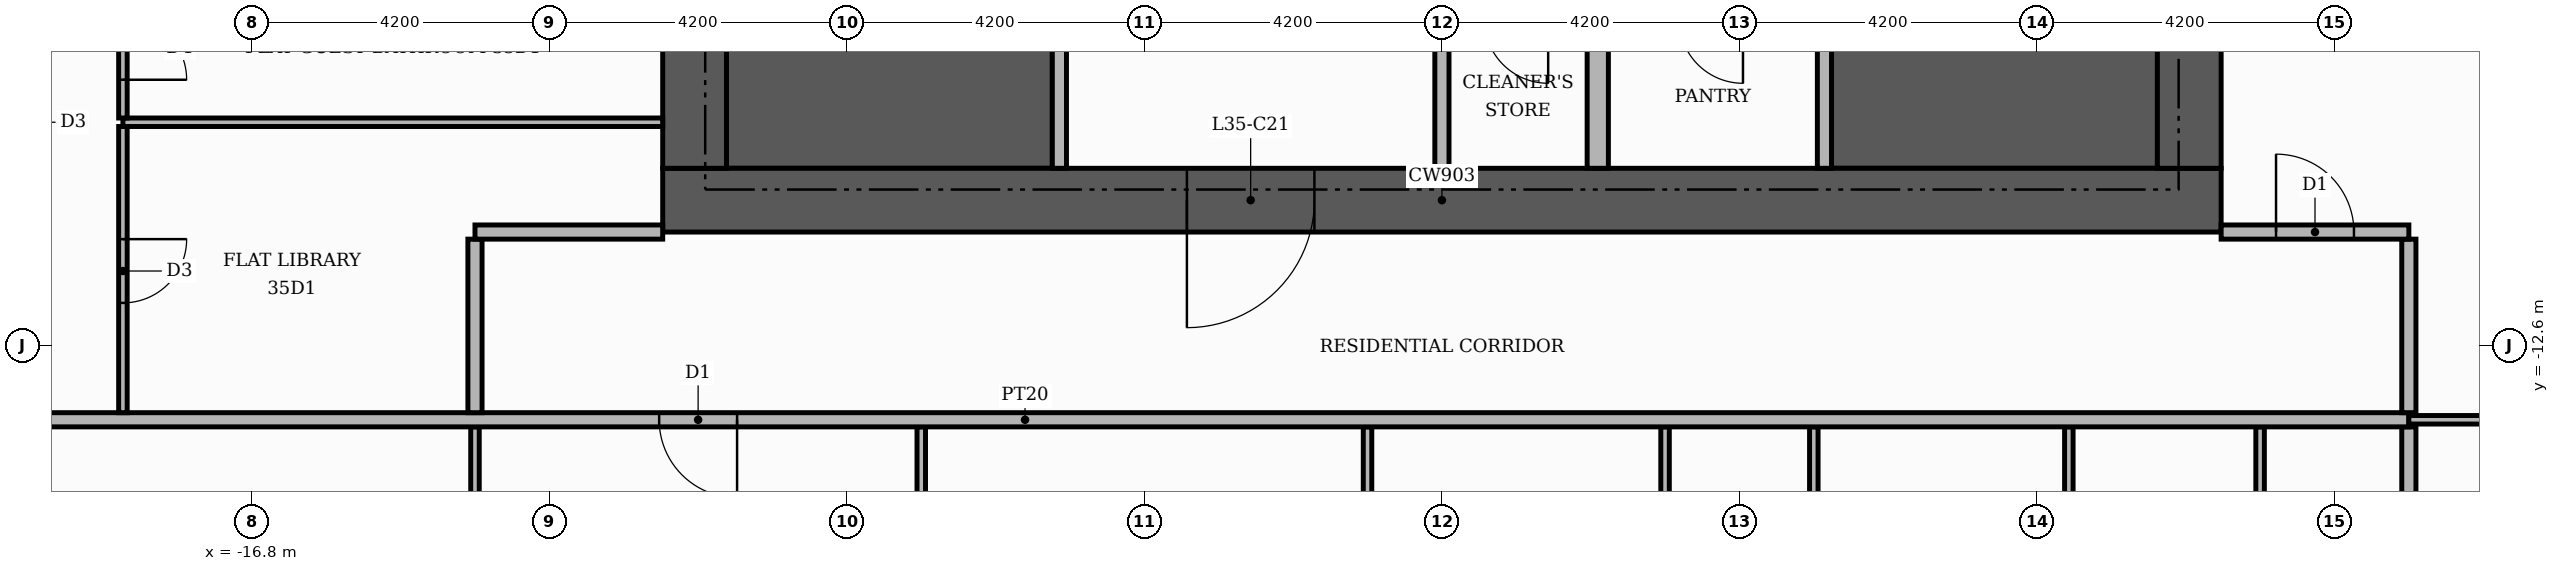
"""IFC4 building model, lengths in metres.
Left out: names, types, materials, properties, quantities, classifications, styles, units other than length and angle.
Written with IfcOpenShell. Run it as: python <this file> out.ifc"""

import sys

from ifc_helpers import new_model, si_unit, direction, frame, frame_2d, origin, place, context, subcontext, project, spatial, rectangle, extrude, element, fill, save


model = new_model("IFC4")
c1 = context("Model", 3, precision=1e-05, world=origin(), true_north=direction((0.0, 1.0)))
c2 = subcontext(c1, "Body", "Model", "MODEL_VIEW")
j1 = project(units=[si_unit("LENGTHUNIT", "METRE"), si_unit("PLANEANGLEUNIT", "RADIAN")], contexts=[c1])
p1 = place(None, origin())
s1 = spatial("IfcSite", under=j1, at=p1, CompositionType="ELEMENT")
p2 = place(p1, origin())
s2 = spatial("IfcBuilding", under=s1, at=p2, CompositionType="ELEMENT")
p3 = place(p2, frame((0.0, 0.0, 149.4)))
s3 = spatial("IfcBuildingStorey", under=s2, at=p3, CompositionType="ELEMENT", Elevation=149.4)
for number, where, z_axis, x_axis in (
    (1, (-10.1, -9.15, 0.0), (0.0, 0.0, 1.0), (1.0, 0.0, 0.0)),
    (2, (5.5, -9.15, 0.0), (0.0, 0.0, 1.0), (1.0, 0.0, 0.0)),
):
    element("IfcWall", number, at=place(p3, frame(where, z_axis=z_axis, x_axis=x_axis)), inside=s3, PredefinedType="SHEAR", context=c2, shape_type="SweptSolid", body=[
        extrude(rectangle(XDim=4.6, YDim=1.9, at=frame_2d((2.3, 0.0))), origin(), (0.0, 0.0, 1.0), 3.48),
    ])
p4 = place(p3, frame((-11.0, -10.55, 0.0), z_axis=(0.0, 0.0, 1.0), x_axis=(1.0, 0.0, 0.0)))
e3 = element("IfcWall", 3, at=p4, inside=s3, PredefinedType="SHEAR", context=c2, shape_type="SweptSolid", body=[
    extrude(rectangle(XDim=22.0, YDim=0.9, at=frame_2d((11.0, 0.0))), origin(), (0.0, 0.0, 1.0), 3.48),
])
p5 = place(p4, frame((7.4, 0.0, 0.0)))
e4 = element("IfcOpeningElement", 4, at=p5, cuts=e3, PredefinedType="OPENING", context=c2, shape_type="SweptSolid", body=[
    extrude(rectangle(XDim=1.8, YDim=2.2, at=frame_2d((0.9, 1.1))), frame((0.0, 0.46, 0.0), z_axis=(0.0, -1.0, 0.0), x_axis=(1.0, 0.0, 0.0)), (0.0, 0.0, 1.0), 0.92),
])
for number, where, z_axis, x_axis in (
    (5, (-10.55, -10.1, 0.0), (0.0, 0.0, 1.0), (0.0, 1.0, 0.0)),
    (6, (10.55, -10.1, 0.0), (0.0, 0.0, 1.0), (0.0, 1.0, 0.0)),
):
    element("IfcWall", number, at=place(p3, frame(where, z_axis=z_axis, x_axis=x_axis)), inside=s3, PredefinedType="SHEAR", context=c2, shape_type="SweptSolid", body=[
        extrude(rectangle(XDim=20.2, YDim=0.9, at=frame_2d((10.1, 0.0))), origin(), (0.0, 0.0, 1.0), 3.48),
    ])
p6 = place(p3, frame((-5.4, -10.1, 0.0), z_axis=(0.0, 0.0, 1.0), x_axis=(0.0, 1.0, 0.0)))
e7 = element("IfcWall", 7, at=p6, inside=s3, PredefinedType="PARTITIONING", context=c2, shape_type="SweptSolid", body=[
    extrude(rectangle(XDim=4.6, YDim=0.2, at=frame_2d((2.3, 0.0))), origin(), (0.0, 0.0, 1.0), 3.48),
])
p7 = place(p6, frame((2.9, 0.0, 0.0)))
e8 = element("IfcOpeningElement", 8, at=p7, cuts=e7, PredefinedType="OPENING", context=c2, shape_type="SweptSolid", body=[
    extrude(rectangle(XDim=1.0, YDim=2.1, at=frame_2d((0.5, 1.05))), frame((0.0, 0.11, 0.0), z_axis=(0.0, -1.0, 0.0), x_axis=(1.0, 0.0, 0.0)), (0.0, 0.0, 1.0), 0.22),
])
p8 = place(p3, frame((0.0, -10.1, 0.0), z_axis=(0.0, 0.0, 1.0), x_axis=(0.0, 1.0, 0.0)))
e9 = element("IfcWall", 9, at=p8, inside=s3, PredefinedType="PARTITIONING", context=c2, shape_type="SweptSolid", body=[
    extrude(rectangle(XDim=2.2, YDim=0.2, at=frame_2d((1.1, 0.0))), origin(), (0.0, 0.0, 1.0), 3.48),
])
p9 = place(p3, frame((2.2, -10.1, 0.0), z_axis=(0.0, 0.0, 1.0), x_axis=(0.0, 1.0, 0.0)))
e10 = element("IfcWall", 10, at=p9, inside=s3, PredefinedType="PARTITIONING", context=c2, shape_type="SweptSolid", body=[
    extrude(rectangle(XDim=2.2, YDim=0.3, at=frame_2d((1.1, 0.0))), origin(), (0.0, 0.0, 1.0), 3.48),
])
p10 = place(p3, frame((5.4, -10.1, 0.0), z_axis=(0.0, 0.0, 1.0), x_axis=(0.0, 1.0, 0.0)))
e11 = element("IfcWall", 11, at=p10, inside=s3, PredefinedType="PARTITIONING", context=c2, shape_type="SweptSolid", body=[
    extrude(rectangle(XDim=4.6, YDim=0.2, at=frame_2d((2.3, 0.0))), origin(), (0.0, 0.0, 1.0), 3.48),
])
p11 = place(p10, frame((2.9, 0.0, 0.0)))
e12 = element("IfcOpeningElement", 12, at=p11, cuts=e11, PredefinedType="OPENING", context=c2, shape_type="SweptSolid", body=[
    extrude(rectangle(XDim=1.0, YDim=2.1, at=frame_2d((0.5, 1.05))), frame((0.0, 0.11, 0.0), z_axis=(0.0, -1.0, 0.0), x_axis=(1.0, 0.0, 0.0)), (0.0, 0.0, 1.0), 0.22),
])
p12 = place(p3, frame((13.65, -25.42, 0.0), z_axis=(0.0, 0.0, 1.0), x_axis=(0.0, 1.0, 0.0)))
e13 = element("IfcWall", 13, at=p12, inside=s3, PredefinedType="PARTITIONING", context=c2, shape_type="SweptSolid", body=[
    extrude(rectangle(XDim=11.67, YDim=0.2, at=frame_2d((5.835, 0.0))), origin(), (0.0, 0.0, 1.0), 3.48),
])
p13 = place(p3, frame((-13.65, -20.66, 0.0), z_axis=(0.0, 0.0, 1.0), x_axis=(0.0, 1.0, 0.0)))
e14 = element("IfcWall", 14, at=p13, inside=s3, PredefinedType="PARTITIONING", context=c2, shape_type="SweptSolid", body=[
    extrude(rectangle(XDim=6.91, YDim=0.12, at=frame_2d((3.455, 0.0))), origin(), (0.0, 0.0, 1.0), 3.48),
])
p14 = place(p13, frame((3.025, 0.0, 0.0)))
e15 = element("IfcOpeningElement", 15, at=p14, cuts=e14, PredefinedType="OPENING", context=c2, shape_type="SweptSolid", body=[
    extrude(rectangle(XDim=0.9, YDim=2.1, at=frame_2d((0.45, 1.05))), frame((0.0, 0.07, 0.0), z_axis=(0.0, -1.0, 0.0), x_axis=(1.0, 0.0, 0.0)), (0.0, 0.0, 1.0), 0.14),
])
for number, where, z_axis, x_axis in (
    (16, (-7.35, -19.16, 0.0), (0.0, 0.0, 1.0), (0.0, 1.0, 0.0)),
    (17, (-1.05, -19.16, 0.0), (0.0, 0.0, 1.0), (0.0, 1.0, 0.0)),
    (18, (3.15, -19.16, 0.0), (0.0, 0.0, 1.0), (0.0, 1.0, 0.0)),
    (19, (5.25, -19.16, 0.0), (0.0, 0.0, 1.0), (0.0, 1.0, 0.0)),
    (20, (8.85, -19.16, 0.0), (0.0, 0.0, 1.0), (0.0, 1.0, 0.0)),
    (21, (11.55, -19.16, 0.0), (0.0, 0.0, 1.0), (0.0, 1.0, 0.0)),
):
    element("IfcWall", number, at=place(p3, frame(where, z_axis=z_axis, x_axis=x_axis)), inside=s3, PredefinedType="PARTITIONING", context=c2, shape_type="SweptSolid", body=[
        extrude(rectangle(XDim=5.41, YDim=0.12, at=frame_2d((2.705, 0.0))), origin(), (0.0, 0.0, 1.0), 3.48),
    ])
p15 = place(p3, frame((-25.42, -13.65, 0.0), z_axis=(0.0, 0.0, 1.0), x_axis=(1.0, 0.0, 0.0)))
e22 = element("IfcWall", 22, at=p15, inside=s3, PredefinedType="PARTITIONING", context=c2, shape_type="SweptSolid", body=[
    extrude(rectangle(XDim=39.07, YDim=0.2, at=frame_2d((19.535, 0.0))), origin(), (0.0, 0.0, 1.0), 3.48),
])
p16 = place(p15, frame((14.37, 0.0, 0.0)))
e23 = element("IfcOpeningElement", 23, at=p16, cuts=e22, PredefinedType="OPENING", context=c2, shape_type="SweptSolid", body=[
    extrude(rectangle(XDim=1.1, YDim=2.4, at=frame_2d((0.55, 1.2))), frame((0.0, 0.11, 0.0), z_axis=(0.0, -1.0, 0.0), x_axis=(1.0, 0.0, 0.0)), (0.0, 0.0, 1.0), 0.22),
])
p17 = place(p3, frame((13.65, -13.65, 0.0), z_axis=(0.0, 0.0, 1.0), x_axis=(1.0, 0.0, 0.0)))
e24 = element("IfcWall", 24, at=p17, inside=s3, PredefinedType="PARTITIONING", context=c2, shape_type="SweptSolid", body=[
    extrude(rectangle(XDim=6.17, YDim=0.12, at=frame_2d((3.085, 0.0))), origin(), (0.0, 0.0, 1.0), 3.48),
])
p18 = place(p17, frame((2.635, 0.0, 0.0)))
e25 = element("IfcOpeningElement", 25, at=p18, cuts=e24, PredefinedType="OPENING", context=c2, shape_type="SweptSolid", body=[
    extrude(rectangle(XDim=0.9, YDim=2.1, at=frame_2d((0.45, 1.05))), frame((0.0, 0.07, 0.0), z_axis=(0.0, -1.0, 0.0), x_axis=(1.0, 0.0, 0.0)), (0.0, 0.0, 1.0), 0.14),
])
p19 = place(p3, frame((-18.62, -13.55, 0.0), z_axis=(0.0, 0.0, 1.0), x_axis=(0.0, 1.0, 0.0)))
e26 = element("IfcWall", 26, at=p19, inside=s3, PredefinedType="PARTITIONING", context=c2, shape_type="SweptSolid", body=[
    extrude(rectangle(XDim=4.04, YDim=0.12, at=frame_2d((2.02, 0.0))), origin(), (0.0, 0.0, 1.0), 3.48),
])
p20 = place(p19, frame((1.55, 0.0, 0.0)))
e27 = element("IfcOpeningElement", 27, at=p20, cuts=e26, PredefinedType="OPENING", context=c2, shape_type="SweptSolid", body=[
    extrude(rectangle(XDim=0.9, YDim=2.1, at=frame_2d((0.45, 1.05))), frame((0.0, 0.07, 0.0), z_axis=(0.0, -1.0, 0.0), x_axis=(1.0, 0.0, 0.0)), (0.0, 0.0, 1.0), 0.14),
])
for number, where, z_axis, x_axis in (
    (28, (-13.65, -13.55, 0.0), (0.0, 0.0, 1.0), (0.0, 1.0, 0.0)),
    (29, (13.65, -13.55, 0.0), (0.0, 0.0, 1.0), (0.0, 1.0, 0.0)),
):
    element("IfcWall", number, at=place(p3, frame(where, z_axis=z_axis, x_axis=x_axis)), inside=s3, PredefinedType="PARTITIONING", context=c2, shape_type="SweptSolid", body=[
        extrude(rectangle(XDim=2.45, YDim=0.2, at=frame_2d((1.225, 0.0))), origin(), (0.0, 0.0, 1.0), 3.48),
    ])
p21 = place(p3, frame((-13.65, -11.0, 0.0), z_axis=(0.0, 0.0, 1.0), x_axis=(1.0, 0.0, 0.0)))
e30 = element("IfcWall", 30, at=p21, inside=s3, PredefinedType="PARTITIONING", context=c2, shape_type="SweptSolid", body=[
    extrude(rectangle(XDim=2.65, YDim=0.2, at=frame_2d((1.325, 0.0))), origin(), (0.0, 0.0, 1.0), 3.48),
])
p22 = place(p3, frame((11.0, -11.0, 0.0), z_axis=(0.0, 0.0, 1.0), x_axis=(1.0, 0.0, 0.0)))
e31 = element("IfcWall", 31, at=p22, inside=s3, PredefinedType="PARTITIONING", context=c2, shape_type="SweptSolid", body=[
    extrude(rectangle(XDim=2.65, YDim=0.2, at=frame_2d((1.325, 0.0))), origin(), (0.0, 0.0, 1.0), 3.48),
])
p23 = place(p22, frame((0.775, 0.0, 0.0)))
e32 = element("IfcOpeningElement", 32, at=p23, cuts=e31, PredefinedType="OPENING", context=c2, shape_type="SweptSolid", body=[
    extrude(rectangle(XDim=1.1, YDim=2.4, at=frame_2d((0.55, 1.2))), frame((0.0, 0.11, 0.0), z_axis=(0.0, -1.0, 0.0), x_axis=(1.0, 0.0, 0.0)), (0.0, 0.0, 1.0), 0.22),
])
p24 = place(p3, frame((-18.62, -9.45, 0.0), z_axis=(0.0, 0.0, 1.0), x_axis=(1.0, 0.0, 0.0)))
e33 = element("IfcWall", 33, at=p24, inside=s3, PredefinedType="PARTITIONING", context=c2, shape_type="SweptSolid", body=[
    extrude(rectangle(XDim=7.62, YDim=0.12, at=frame_2d((3.81, 0.0))), origin(), (0.0, 0.0, 1.0), 3.48),
])
p25 = place(p3, frame((-18.62, -9.39, 0.0), z_axis=(0.0, 0.0, 1.0), x_axis=(0.0, 1.0, 0.0)))
e34 = element("IfcWall", 34, at=p25, inside=s3, PredefinedType="PARTITIONING", context=c2, shape_type="SweptSolid", body=[
    extrude(rectangle(XDim=1.98, YDim=0.12, at=frame_2d((0.99, 0.0))), origin(), (0.0, 0.0, 1.0), 3.48),
])
p26 = place(p25, frame((0.54, 0.0, 0.0)))
e35 = element("IfcOpeningElement", 35, at=p26, cuts=e34, PredefinedType="OPENING", context=c2, shape_type="SweptSolid", body=[
    extrude(rectangle(XDim=0.9, YDim=2.1, at=frame_2d((0.45, 1.05))), frame((0.0, 0.07, 0.0), z_axis=(0.0, -1.0, 0.0), x_axis=(1.0, 0.0, 0.0)), (0.0, 0.0, 1.0), 0.14),
])
p27 = place(p5, frame((1.8, 0.0, 0.0), z_axis=(0.0, 0.0, 1.0), x_axis=(-1.0, 0.0, 0.0)))
e36 = element("IfcDoor", 36, at=p27, inside=s3, OperationType="DOUBLE_DOOR_SINGLE_SWING", PredefinedType="DOOR", context=c2, shape_type="SweptSolid", body=[
    extrude(rectangle(XDim=1.8, YDim=2.2, at=frame_2d((0.9, 1.1))), frame((0.0, 0.025, 0.0), z_axis=(0.0, -1.0, 0.0), x_axis=(1.0, 0.0, 0.0)), (0.0, 0.0, 1.0), 0.05),
])
fill(e4, e36)
p28 = place(p16, frame((1.1, 0.0, 0.0), z_axis=(0.0, 0.0, 1.0), x_axis=(-1.0, 0.0, 0.0)))
e37 = element("IfcDoor", 37, at=p28, inside=s3, OperationType="SINGLE_SWING_RIGHT", PredefinedType="DOOR", context=c2, shape_type="SweptSolid", body=[
    extrude(rectangle(XDim=1.1, YDim=2.4, at=frame_2d((0.55, 1.2))), frame((0.0, 0.025, 0.0), z_axis=(0.0, -1.0, 0.0), x_axis=(1.0, 0.0, 0.0)), (0.0, 0.0, 1.0), 0.05),
])
fill(e23, e37)
p29 = place(p23, origin())
e38 = element("IfcDoor", 38, at=p29, inside=s3, OperationType="SINGLE_SWING_LEFT", PredefinedType="DOOR", context=c2, shape_type="SweptSolid", body=[
    extrude(rectangle(XDim=1.1, YDim=2.4, at=frame_2d((0.55, 1.2))), frame((0.0, 0.025, 0.0), z_axis=(0.0, -1.0, 0.0), x_axis=(1.0, 0.0, 0.0)), (0.0, 0.0, 1.0), 0.05),
])
fill(e32, e38)
p30 = place(p26, frame((0.9, 0.0, 0.0), z_axis=(0.0, 0.0, 1.0), x_axis=(-1.0, 0.0, 0.0)))
e39 = element("IfcDoor", 39, at=p30, inside=s3, OperationType="SINGLE_SWING_LEFT", PredefinedType="DOOR", context=c2, shape_type="SweptSolid", body=[
    extrude(rectangle(XDim=0.9, YDim=2.1, at=frame_2d((0.45, 1.05))), frame((0.0, 0.025, 0.0), z_axis=(0.0, -1.0, 0.0), x_axis=(1.0, 0.0, 0.0)), (0.0, 0.0, 1.0), 0.05),
])
fill(e35, e39)
p31 = place(p20, frame((0.9, 0.0, 0.0), z_axis=(0.0, 0.0, 1.0), x_axis=(-1.0, 0.0, 0.0)))
e40 = element("IfcDoor", 40, at=p31, inside=s3, OperationType="SINGLE_SWING_RIGHT", PredefinedType="DOOR", context=c2, shape_type="SweptSolid", body=[
    extrude(rectangle(XDim=0.9, YDim=2.1, at=frame_2d((0.45, 1.05))), frame((0.0, 0.025, 0.0), z_axis=(0.0, -1.0, 0.0), x_axis=(1.0, 0.0, 0.0)), (0.0, 0.0, 1.0), 0.05),
])
fill(e27, e40)
save(model, sys.argv[1])
